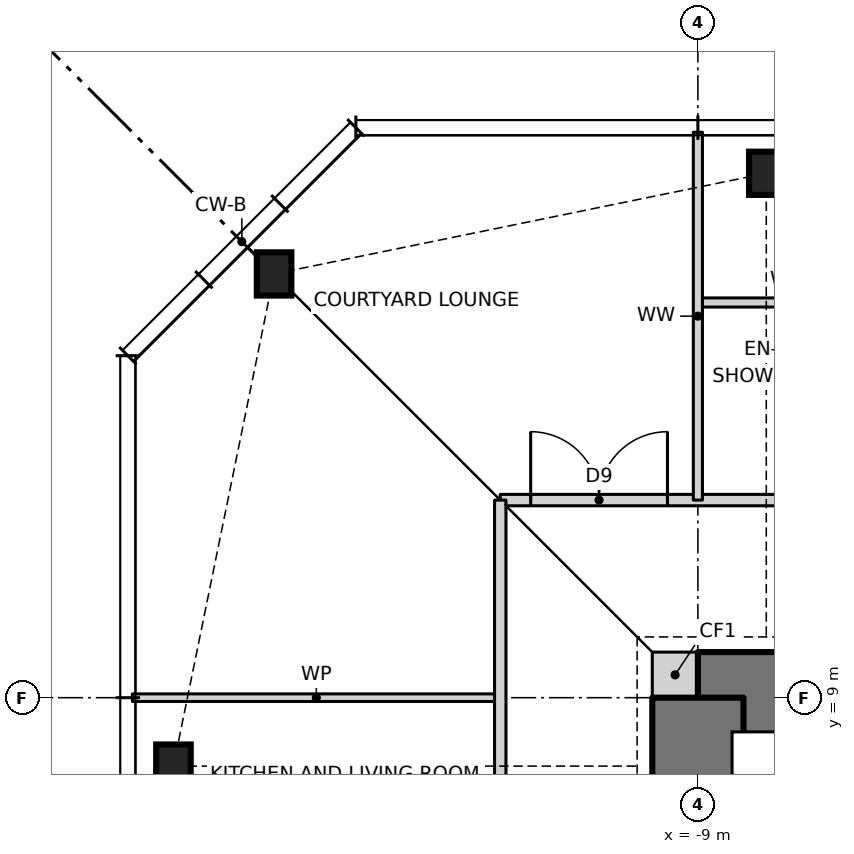
"""IFC4 building model, lengths in metres.
Left out: names, types, materials, properties, quantities, classifications, styles, units other than length and angle.
Written with IfcOpenShell. Run it as: python <this file> out.ifc"""

import sys

from ifc_helpers import new_model, si_unit, direction, frame, frame_2d, origin, origin_2d, place, context, subcontext, project, spatial, rectangle, i_section, extrude, element, fill, save


model = new_model("IFC4")
c1 = context("Model", 3, precision=1e-05, world=origin(), true_north=direction((0.0, 1.0)))
c2 = subcontext(c1, "Body", "Model", "MODEL_VIEW")
j1 = project(units=[si_unit("LENGTHUNIT", "METRE"), si_unit("PLANEANGLEUNIT", "RADIAN")], contexts=[c1])
p1 = place(None, origin())
s1 = spatial("IfcSite", under=j1, at=p1, CompositionType="ELEMENT")
p2 = place(p1, origin())
s2 = spatial("IfcBuilding", under=s1, at=p2, CompositionType="ELEMENT")
p3 = place(p2, frame((0.0, 0.0, 218.5)))
s3 = spatial("IfcBuildingStorey", under=s2, at=p3, CompositionType="ELEMENT", Elevation=218.5)
for number, where, z_axis, x_axis in (
    (1, (-8.1, 15.9, 0.0), (0.0, 0.0, 1.0), (1.0, 0.0, 0.0)),
    (2, (-14.576, 14.576, 0.0), (0.0, 0.0, 1.0), (1.0, 0.0, 0.0)),
    (3, (-15.9, 8.1, 0.0), (0.0, 0.0, 1.0), (1.0, 0.0, 0.0)),
):
    element("IfcColumn", number, at=place(p3, frame(where, z_axis=z_axis, x_axis=x_axis)), inside=s3, PredefinedType="COLUMN", context=c2, shape_type="SweptSolid", body=[
        extrude(i_section(OverallWidth=0.455, OverallDepth=0.569, WebThickness=0.078, FlangeThickness=0.125, at=origin_2d()), origin(), (0.0, 0.0, 1.0), 3.5),
    ])
p4 = place(p3, frame((-9.6, 9.3, 0.0), z_axis=(0.0, 0.0, 1.0), x_axis=(1.0, 0.0, 0.0)))
e4 = element("IfcWall", 4, at=p4, inside=s3, PredefinedType="SOLIDWALL", context=c2, shape_type="SweptSolid", body=[
    extrude(rectangle(XDim=0.6, YDim=0.6, at=frame_2d((0.3, 0.0))), origin(), (0.0, 0.0, 1.0), 3.5),
])
p5 = place(p3, frame((9.0, 9.0, 0.0), z_axis=(0.0, 0.0, 1.0), x_axis=(-1.0, 0.0, 0.0)))
e5 = element("IfcWall", 5, at=p5, inside=s3, PredefinedType="SHEAR", context=c2, shape_type="SweptSolid", body=[
    extrude(rectangle(XDim=18.0, YDim=1.2, at=frame_2d((9.0, 0.0))), origin(), (0.0, 0.0, 1.0), 3.5),
])
p6 = place(p5, frame((11.125, 0.0, 0.0)))
e6 = element("IfcOpeningElement", 6, at=p6, cuts=e5, PredefinedType="OPENING", context=c2, shape_type="SweptSolid", body=[
    extrude(rectangle(XDim=0.9, YDim=2.1, at=frame_2d((0.45, 1.05))), frame((0.0, 0.61, 0.0), z_axis=(0.0, -1.0, 0.0), x_axis=(1.0, 0.0, 0.0)), (0.0, 0.0, 1.0), 1.22),
])
p7 = place(p5, frame((4.275, 0.0, 0.0)))
e7 = element("IfcOpeningElement", 7, at=p7, cuts=e5, PredefinedType="OPENING", context=c2, shape_type="SweptSolid", body=[
    extrude(rectangle(XDim=0.9, YDim=2.1, at=frame_2d((0.45, 1.05))), frame((0.0, 0.61, 0.0), z_axis=(0.0, -1.0, 0.0), x_axis=(1.0, 0.0, 0.0)), (0.0, 0.0, 1.0), 1.22),
])
p8 = place(p3, frame((-9.0, 9.0, 0.0), z_axis=(0.0, 0.0, 1.0), x_axis=(0.0, -1.0, 0.0)))
e8 = element("IfcWall", 8, at=p8, inside=s3, PredefinedType="SHEAR", context=c2, shape_type="SweptSolid", body=[
    extrude(rectangle(XDim=18.0, YDim=1.2, at=frame_2d((9.0, 0.0))), origin(), (0.0, 0.0, 1.0), 3.5),
])
p9 = place(p8, frame((8.5, 0.0, 0.0)))
e9 = element("IfcOpeningElement", 9, at=p9, cuts=e8, PredefinedType="OPENING", context=c2, shape_type="SweptSolid", body=[
    extrude(rectangle(XDim=1.0, YDim=2.1, at=frame_2d((0.5, 1.05))), frame((0.0, 0.61, 0.0), z_axis=(0.0, -1.0, 0.0), x_axis=(1.0, 0.0, 0.0)), (0.0, 0.0, 1.0), 1.22),
])
p10 = place(p3, frame((-16.44, 9.0, 0.0), z_axis=(0.0, 0.0, 1.0), x_axis=(1.0, 0.0, 0.0)))
e10 = element("IfcWall", 10, at=p10, inside=s3, PredefinedType="PARTITIONING", context=c2, shape_type="SweptSolid", body=[
    extrude(rectangle(XDim=4.84, YDim=0.1, at=frame_2d((2.42, 0.0))), origin(), (0.0, 0.0, 1.0), 3.27),
])
p11 = place(p3, frame((-11.6, 11.6, 0.0), z_axis=(0.0, 0.0, 1.0), x_axis=(1.0, 0.0, 0.0)))
e11 = element("IfcWall", 11, at=p11, inside=s3, PredefinedType="PARTITIONING", context=c2, shape_type="SweptSolid", body=[
    extrude(rectangle(XDim=23.2, YDim=0.15, at=frame_2d((11.6, 0.0))), origin(), (0.0, 0.0, 1.0), 3.27),
])
p12 = place(p11, frame((16.65, 0.0, 0.0)))
e12 = element("IfcOpeningElement", 12, at=p12, cuts=e11, PredefinedType="OPENING", context=c2, shape_type="SweptSolid", body=[
    extrude(rectangle(XDim=1.0, YDim=2.1, at=frame_2d((0.5, 1.05))), frame((0.0, 0.085, 0.0), z_axis=(0.0, -1.0, 0.0), x_axis=(1.0, 0.0, 0.0)), (0.0, 0.0, 1.0), 0.17),
])
p13 = place(p11, frame((14.55, 0.0, 0.0)))
e13 = element("IfcOpeningElement", 13, at=p13, cuts=e11, PredefinedType="OPENING", context=c2, shape_type="SweptSolid", body=[
    extrude(rectangle(XDim=1.0, YDim=2.1, at=frame_2d((0.5, 1.05))), frame((0.0, 0.085, 0.0), z_axis=(0.0, -1.0, 0.0), x_axis=(1.0, 0.0, 0.0)), (0.0, 0.0, 1.0), 0.17),
])
p14 = place(p11, frame((7.65, 0.0, 0.0)))
e14 = element("IfcOpeningElement", 14, at=p14, cuts=e11, PredefinedType="OPENING", context=c2, shape_type="SweptSolid", body=[
    extrude(rectangle(XDim=1.0, YDim=2.1, at=frame_2d((0.5, 1.05))), frame((0.0, 0.085, 0.0), z_axis=(0.0, -1.0, 0.0), x_axis=(1.0, 0.0, 0.0)), (0.0, 0.0, 1.0), 0.17),
])
p15 = place(p11, frame((5.55, 0.0, 0.0)))
e15 = element("IfcOpeningElement", 15, at=p15, cuts=e11, PredefinedType="OPENING", context=c2, shape_type="SweptSolid", body=[
    extrude(rectangle(XDim=1.0, YDim=2.1, at=frame_2d((0.5, 1.05))), frame((0.0, 0.085, 0.0), z_axis=(0.0, -1.0, 0.0), x_axis=(1.0, 0.0, 0.0)), (0.0, 0.0, 1.0), 0.17),
])
p16 = place(p11, frame((0.4, 0.0, 0.0)))
e16 = element("IfcOpeningElement", 16, at=p16, cuts=e11, PredefinedType="OPENING", context=c2, shape_type="SweptSolid", body=[
    extrude(rectangle(XDim=1.8, YDim=2.1, at=frame_2d((0.9, 1.05))), frame((0.0, 0.085, 0.0), z_axis=(0.0, -1.0, 0.0), x_axis=(1.0, 0.0, 0.0)), (0.0, 0.0, 1.0), 0.17),
])
p17 = place(p3, frame((-9.0, 14.2, 0.0), z_axis=(0.0, 0.0, 1.0), x_axis=(1.0, 0.0, 0.0)))
e17 = element("IfcWall", 17, at=p17, inside=s3, PredefinedType="PARTITIONING", context=c2, shape_type="SweptSolid", body=[
    extrude(rectangle(XDim=2.4, YDim=0.12, at=frame_2d((1.2, 0.0))), origin(), (0.0, 0.0, 1.0), 3.27),
])
p18 = place(p3, frame((-9.0, 11.6, 0.0), z_axis=(0.0, 0.0, 1.0), x_axis=(0.0, 1.0, 0.0)))
e18 = element("IfcWall", 18, at=p18, inside=s3, PredefinedType="PARTITIONING", context=c2, shape_type="SweptSolid", body=[
    extrude(rectangle(XDim=4.84, YDim=0.12, at=frame_2d((2.42, 0.0))), origin(), (0.0, 0.0, 1.0), 3.27),
])
p19 = place(p3, frame((-11.6, -11.6, 0.0), z_axis=(0.0, 0.0, 1.0), x_axis=(0.0, 1.0, 0.0)))
e19 = element("IfcWall", 19, at=p19, inside=s3, PredefinedType="PARTITIONING", context=c2, shape_type="SweptSolid", body=[
    extrude(rectangle(XDim=23.2, YDim=0.15, at=frame_2d((11.6, 0.0))), origin(), (0.0, 0.0, 1.0), 3.27),
])
p20 = place(p19, frame((16.5, 0.0, 0.0)))
e20 = element("IfcOpeningElement", 20, at=p20, cuts=e19, PredefinedType="OPENING", context=c2, shape_type="SweptSolid", body=[
    extrude(rectangle(XDim=1.0, YDim=2.1, at=frame_2d((0.5, 1.05))), frame((0.0, 0.085, 0.0), z_axis=(0.0, -1.0, 0.0), x_axis=(1.0, 0.0, 0.0)), (0.0, 0.0, 1.0), 0.17),
])
p21 = place(p19, frame((10.05, 0.0, 0.0)))
e21 = element("IfcOpeningElement", 21, at=p21, cuts=e19, PredefinedType="OPENING", context=c2, shape_type="SweptSolid", body=[
    extrude(rectangle(XDim=1.0, YDim=2.1, at=frame_2d((0.5, 1.05))), frame((0.0, 0.085, 0.0), z_axis=(0.0, -1.0, 0.0), x_axis=(1.0, 0.0, 0.0)), (0.0, 0.0, 1.0), 0.17),
])
p22 = place(p19, frame((3.15, 0.0, 0.0)))
e22 = element("IfcOpeningElement", 22, at=p22, cuts=e19, PredefinedType="OPENING", context=c2, shape_type="SweptSolid", body=[
    extrude(rectangle(XDim=1.0, YDim=2.1, at=frame_2d((0.5, 1.05))), frame((0.0, 0.085, 0.0), z_axis=(0.0, -1.0, 0.0), x_axis=(1.0, 0.0, 0.0)), (0.0, 0.0, 1.0), 0.17),
])
p23 = place(p19, frame((0.875, 0.0, 0.0)))
e23 = element("IfcOpeningElement", 23, at=p23, cuts=e19, PredefinedType="OPENING", context=c2, shape_type="SweptSolid", body=[
    extrude(rectangle(XDim=0.85, YDim=2.1, at=frame_2d((0.425, 1.05))), frame((0.0, 0.085, 0.0), z_axis=(0.0, -1.0, 0.0), x_axis=(1.0, 0.0, 0.0)), (0.0, 0.0, 1.0), 0.17),
])
p24 = place(p16, origin())
e24 = element("IfcDoor", 24, at=p24, inside=s3, OperationType="DOUBLE_DOOR_SINGLE_SWING", PredefinedType="DOOR", context=c2, shape_type="SweptSolid", body=[
    extrude(rectangle(XDim=1.8, YDim=2.1, at=frame_2d((0.9, 1.05))), frame((0.0, 0.025, 0.0), z_axis=(0.0, -1.0, 0.0), x_axis=(1.0, 0.0, 0.0)), (0.0, 0.0, 1.0), 0.05),
])
fill(e16, e24)
save(model, sys.argv[1])
